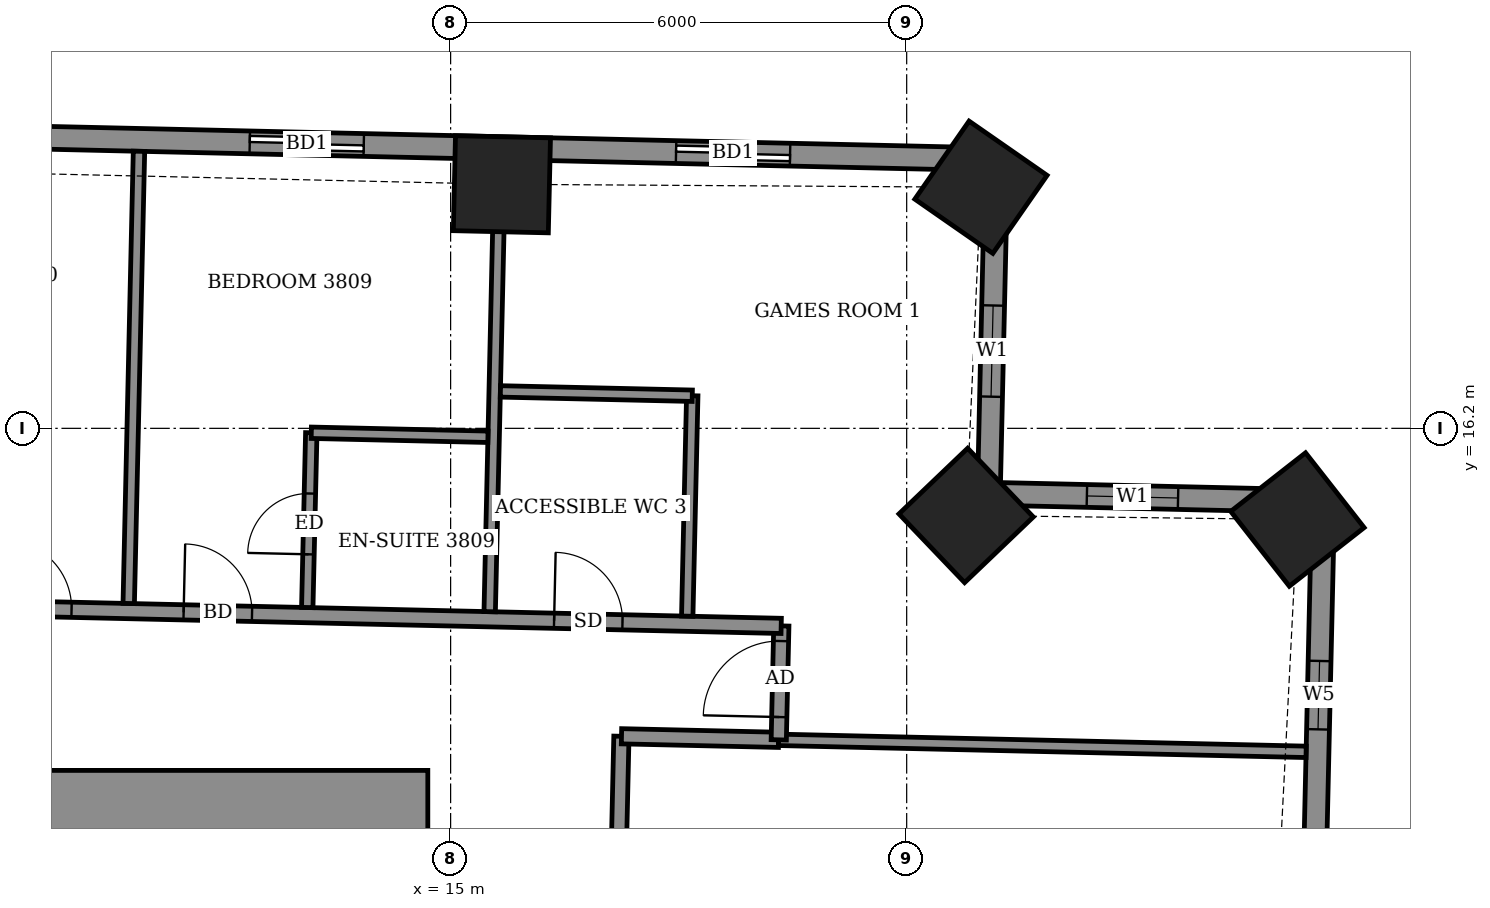
"""IFC4 building model, lengths in metres.
Left out: names, types, materials, properties, quantities, classifications, styles, units other than length and angle.
Written with IfcOpenShell. Run it as: python <this file> out.ifc"""

import sys

from ifc_helpers import new_model, si_unit, direction, frame, frame_2d, origin, origin_2d, place, context, subcontext, project, spatial, rectangle, extrude, element, fill, save


model = new_model("IFC4")
c1 = context("Model", 3, precision=1e-05, world=origin(), true_north=direction((0.0, 1.0)))
c2 = subcontext(c1, "Body", "Model", "MODEL_VIEW")
j1 = project(units=[si_unit("LENGTHUNIT", "METRE"), si_unit("PLANEANGLEUNIT", "RADIAN")], contexts=[c1])
p1 = place(None, origin())
s1 = spatial("IfcSite", under=j1, at=p1, CompositionType="ELEMENT")
p2 = place(p1, origin())
s2 = spatial("IfcBuilding", under=s1, at=p2, CompositionType="ELEMENT")
p3 = place(p2, frame((0.0, 0.0, 152.7)))
s3 = spatial("IfcBuildingStorey", under=s2, at=p3, CompositionType="ELEMENT", Elevation=152.7)
for number, where, z_axis, x_axis in (
    (1, (26.141, 15.001, -0.55), (0.0, 0.0, 1.0), (-0.617, 0.787, 0.0)),
    (2, (21.782, 15.054, -0.55), (0.0, 0.0, 1.0), (-0.691, 0.723, 0.0)),
    (3, (21.977, 19.372, -0.55), (0.0, 0.0, 1.0), (-0.821, 0.571, 0.0)),
    (4, (15.675, 19.411, -0.55), (0.0, 0.0, 1.0), (-1.0, 0.023, 0.0)),
):
    element("IfcColumn", number, at=place(p3, frame(where, z_axis=z_axis, x_axis=x_axis)), inside=s3, PredefinedType="COLUMN", context=c2, shape_type="SweptSolid", body=[
        extrude(rectangle(XDim=1.25, YDim=1.25, at=origin_2d()), origin(), (0.0, 0.0, 1.0), 3.6),
    ])
p4 = place(p3, frame((26.238, 4.613, 0.0), z_axis=(0.0, 0.0, 1.0), x_axis=(0.022761056451, 0.999740933597, 0.0)))
e5 = element("IfcWall", 5, at=p4, inside=s3, PredefinedType="SOLIDWALL", context=c2, shape_type="SweptSolid", body=[
    extrude(rectangle(XDim=10.63, YDim=0.3, at=frame_2d((5.315, 0.0))), origin(), (0.0, 0.0, 1.0), 3.05),
])
p5 = place(p4, frame((3.453, 0.0, 0.0)))
e6 = element("IfcOpeningElement", 6, at=p5, cuts=e5, PredefinedType="OPENING", context=c2, shape_type="SweptSolid", body=[
    extrude(rectangle(XDim=1.2, YDim=2.4, at=frame_2d((0.6, 1.2))), frame((0.0, 0.16, 0.0), z_axis=(0.0, -1.0, 0.0), x_axis=(1.0, 0.0, 0.0)), (0.0, 0.0, 1.0), 0.32),
])
p6 = place(p4, frame((7.629, 0.0, 0.9)))
e7 = element("IfcOpeningElement", 7, at=p6, cuts=e5, PredefinedType="OPENING", context=c2, shape_type="SweptSolid", body=[
    extrude(rectangle(XDim=0.9, YDim=1.5, at=frame_2d((0.45, 0.75))), frame((0.0, 0.16, 0.0), z_axis=(0.0, -1.0, 0.0), x_axis=(1.0, 0.0, 0.0)), (0.0, 0.0, 1.0), 0.32),
])
p7 = place(p3, frame((26.48, 15.24, 0.0), z_axis=(0.0, 0.0, 1.0), x_axis=(-0.999741204967, 0.022749133868, 0.0)))
e8 = element("IfcWall", 8, at=p7, inside=s3, PredefinedType="SOLIDWALL", context=c2, shape_type="SweptSolid", body=[
    extrude(rectangle(XDim=4.4, YDim=0.3, at=frame_2d((2.2, 0.0))), origin(), (0.0, 0.0, 1.0), 2.55),
])
p8 = place(p7, frame((1.91, 0.0, 0.9)))
e9 = element("IfcOpeningElement", 9, at=p8, cuts=e8, PredefinedType="OPENING", context=c2, shape_type="SweptSolid", body=[
    extrude(rectangle(XDim=1.2, YDim=1.5, at=frame_2d((0.6, 0.75))), frame((0.0, 0.16, 0.0), z_axis=(0.0, -1.0, 0.0), x_axis=(1.0, 0.0, 0.0)), (0.0, 0.0, 1.0), 0.32),
])
p9 = place(p3, frame((22.081, 15.34, 0.0), z_axis=(0.0, 0.0, 1.0), x_axis=(0.022693676786, 0.999742465355, 0.0)))
e10 = element("IfcWall", 10, at=p9, inside=s3, PredefinedType="SOLIDWALL", context=c2, shape_type="SweptSolid", body=[
    extrude(rectangle(XDim=4.4, YDim=0.3, at=frame_2d((2.2, 0.0))), origin(), (0.0, 0.0, 1.0), 2.55),
])
p10 = place(p9, frame((1.277, 0.0, 0.9)))
e11 = element("IfcOpeningElement", 11, at=p10, cuts=e10, PredefinedType="OPENING", context=c2, shape_type="SweptSolid", body=[
    extrude(rectangle(XDim=1.2, YDim=1.5, at=frame_2d((0.6, 0.75))), frame((0.0, 0.16, 0.0), z_axis=(0.0, -1.0, 0.0), x_axis=(1.0, 0.0, 0.0)), (0.0, 0.0, 1.0), 0.32),
])
p11 = place(p3, frame((22.181, 19.739, 0.0), z_axis=(0.0, 0.0, 1.0), x_axis=(-0.999742618326, 0.022686936846, 0.0)))
e12 = element("IfcWall", 12, at=p11, inside=s3, PredefinedType="SOLIDWALL", context=c2, shape_type="SweptSolid", body=[
    extrude(rectangle(XDim=39.58, YDim=0.3, at=frame_2d((19.79, 0.0))), origin(), (0.0, 0.0, 1.0), 3.05),
])
p12 = place(p11, frame((2.716, 0.0, 0.0)))
e13 = element("IfcOpeningElement", 13, at=p12, cuts=e12, PredefinedType="OPENING", context=c2, shape_type="SweptSolid", body=[
    extrude(rectangle(XDim=1.5, YDim=2.4, at=frame_2d((0.75, 1.2))), frame((0.0, 0.16, 0.0), z_axis=(0.0, -1.0, 0.0), x_axis=(1.0, 0.0, 0.0)), (0.0, 0.0, 1.0), 0.32),
])
p13 = place(p11, frame((8.326, 0.0, 0.0)))
e14 = element("IfcOpeningElement", 14, at=p13, cuts=e12, PredefinedType="OPENING", context=c2, shape_type="SweptSolid", body=[
    extrude(rectangle(XDim=1.5, YDim=2.4, at=frame_2d((0.75, 1.2))), frame((0.0, 0.16, 0.0), z_axis=(0.0, -1.0, 0.0), x_axis=(1.0, 0.0, 0.0)), (0.0, 0.0, 1.0), 0.32),
])
p14 = place(p11, frame((14.049, 0.0, 0.0)))
e15 = element("IfcOpeningElement", 15, at=p14, cuts=e12, PredefinedType="OPENING", context=c2, shape_type="SweptSolid", body=[
    extrude(rectangle(XDim=1.5, YDim=2.4, at=frame_2d((0.75, 1.2))), frame((0.0, 0.16, 0.0), z_axis=(0.0, -1.0, 0.0), x_axis=(1.0, 0.0, 0.0)), (0.0, 0.0, 1.0), 0.32),
])
p15 = place(p11, frame((16.998, 0.0, 0.0)))
e16 = element("IfcOpeningElement", 16, at=p15, cuts=e12, PredefinedType="OPENING", context=c2, shape_type="SweptSolid", body=[
    extrude(rectangle(XDim=1.5, YDim=2.4, at=frame_2d((0.75, 1.2))), frame((0.0, 0.16, 0.0), z_axis=(0.0, -1.0, 0.0), x_axis=(1.0, 0.0, 0.0)), (0.0, 0.0, 1.0), 0.32),
])
p16 = place(p11, frame((22.48, 0.0, 0.0)))
e17 = element("IfcOpeningElement", 17, at=p16, cuts=e12, PredefinedType="OPENING", context=c2, shape_type="SweptSolid", body=[
    extrude(rectangle(XDim=1.5, YDim=2.4, at=frame_2d((0.75, 1.2))), frame((0.0, 0.16, 0.0), z_axis=(0.0, -1.0, 0.0), x_axis=(1.0, 0.0, 0.0)), (0.0, 0.0, 1.0), 0.32),
])
p17 = place(p11, frame((27.846, 0.0, 0.0)))
e18 = element("IfcOpeningElement", 18, at=p17, cuts=e12, PredefinedType="OPENING", context=c2, shape_type="SweptSolid", body=[
    extrude(rectangle(XDim=1.5, YDim=2.4, at=frame_2d((0.75, 1.2))), frame((0.0, 0.16, 0.0), z_axis=(0.0, -1.0, 0.0), x_axis=(1.0, 0.0, 0.0)), (0.0, 0.0, 1.0), 0.32),
])
p18 = place(p11, frame((30.794, 0.0, 0.0)))
e19 = element("IfcOpeningElement", 19, at=p18, cuts=e12, PredefinedType="OPENING", context=c2, shape_type="SweptSolid", body=[
    extrude(rectangle(XDim=1.5, YDim=2.4, at=frame_2d((0.75, 1.2))), frame((0.0, 0.16, 0.0), z_axis=(0.0, -1.0, 0.0), x_axis=(1.0, 0.0, 0.0)), (0.0, 0.0, 1.0), 0.32),
])
p19 = place(p11, frame((35.705, 0.0, 0.9)))
e20 = element("IfcOpeningElement", 20, at=p19, cuts=e12, PredefinedType="OPENING", context=c2, shape_type="SweptSolid", body=[
    extrude(rectangle(XDim=2.4, YDim=1.5, at=frame_2d((1.2, 0.75))), frame((0.0, 0.16, 0.0), z_axis=(0.0, -1.0, 0.0), x_axis=(1.0, 0.0, 0.0)), (0.0, 0.0, 1.0), 0.32),
])
p20 = place(p3, frame((17.149, 7.832, 0.0), z_axis=(0.0, 0.0, 1.0), x_axis=(0.022729111383, 0.999741660378, 0.0)))
e21 = element("IfcWall", 21, at=p20, inside=s3, PredefinedType="PARTITIONING", context=c2, shape_type="SweptSolid", body=[
    extrude(rectangle(XDim=4.318, YDim=0.2, at=frame_2d((2.159, 0.0))), origin(), (0.0, 0.0, 1.0), 3.05),
])
p21 = place(p20, frame((1.761, 0.0, 0.0)))
e22 = element("IfcOpeningElement", 22, at=p21, cuts=e21, PredefinedType="OPENING", context=c2, shape_type="SweptSolid", body=[
    extrude(rectangle(XDim=1.0, YDim=2.1, at=frame_2d((0.5, 1.05))), frame((0.0, 0.11, 0.0), z_axis=(0.0, -1.0, 0.0), x_axis=(1.0, 0.0, 0.0)), (0.0, 0.0, 1.0), 0.22),
])
p22 = place(p3, frame((17.248, 12.149, 0.0), z_axis=(0.0, 0.0, 1.0), x_axis=(0.999742931749, -0.02267312106, 0.0)))
e23 = element("IfcWall", 23, at=p22, inside=s3, PredefinedType="PARTITIONING", context=c2, shape_type="SweptSolid", body=[
    extrude(rectangle(XDim=2.067, YDim=0.2, at=frame_2d((1.034, 0.0))), origin(), (0.0, 0.0, 1.0), 3.05),
])
p23 = place(p3, frame((19.315, 12.102, 0.0), z_axis=(0.0, 0.0, 1.0), x_axis=(0.999741072391, -0.022754959327, 0.0)))
e24 = element("IfcWall", 24, at=p23, inside=s3, PredefinedType="PARTITIONING", context=c2, shape_type="SweptSolid", body=[
    extrude(rectangle(XDim=6.942, YDim=0.15, at=frame_2d((3.471, 0.0))), origin(), (0.0, 0.0, 1.0), 2.55),
])
p24 = place(p3, frame((19.317, 12.102, 0.0), z_axis=(0.0, 0.0, 1.0), x_axis=(0.02279537805, 0.999740151609, 0.0)))
e25 = element("IfcWall", 25, at=p24, inside=s3, PredefinedType="PARTITIONING", context=c2, shape_type="SweptSolid", body=[
    extrude(rectangle(XDim=1.5, YDim=0.2, at=frame_2d((0.75, 0.0))), origin(), (0.0, 0.0, 1.0), 3.05),
])
p25 = place(p24, frame((0.3, 0.0, 0.0)))
e26 = element("IfcOpeningElement", 26, at=p25, cuts=e25, PredefinedType="OPENING", context=c2, shape_type="SweptSolid", body=[
    extrude(rectangle(XDim=1.0, YDim=2.1, at=frame_2d((0.5, 1.05))), frame((0.0, 0.11, 0.0), z_axis=(0.0, -1.0, 0.0), x_axis=(1.0, 0.0, 0.0)), (0.0, 0.0, 1.0), 0.22),
])
p26 = place(p3, frame((-21.279, 14.523, 0.0), z_axis=(0.0, 0.0, 1.0), x_axis=(0.999742669174, -0.02268469602, 0.0)))
e27 = element("IfcWall", 27, at=p26, inside=s3, PredefinedType="PARTITIONING", context=c2, shape_type="SweptSolid", body=[
    extrude(rectangle(XDim=40.639, YDim=0.2, at=frame_2d((20.319, 0.0))), origin(), (0.0, 0.0, 1.0), 3.05),
])
p27 = place(p26, frame((37.65, 0.0, 0.0)))
e28 = element("IfcOpeningElement", 28, at=p27, cuts=e27, PredefinedType="OPENING", context=c2, shape_type="SweptSolid", body=[
    extrude(rectangle(XDim=0.9, YDim=2.1, at=frame_2d((0.45, 1.05))), frame((0.0, 0.11, 0.0), z_axis=(0.0, -1.0, 0.0), x_axis=(1.0, 0.0, 0.0)), (0.0, 0.0, 1.0), 0.22),
])
p28 = place(p26, frame((32.775, 0.0, 0.0)))
e29 = element("IfcOpeningElement", 29, at=p28, cuts=e27, PredefinedType="OPENING", context=c2, shape_type="SweptSolid", body=[
    extrude(rectangle(XDim=0.9, YDim=2.1, at=frame_2d((0.45, 1.05))), frame((0.0, 0.11, 0.0), z_axis=(0.0, -1.0, 0.0), x_axis=(1.0, 0.0, 0.0)), (0.0, 0.0, 1.0), 0.22),
])
p29 = place(p26, frame((30.4, 0.0, 0.0)))
e30 = element("IfcOpeningElement", 30, at=p29, cuts=e27, PredefinedType="OPENING", context=c2, shape_type="SweptSolid", body=[
    extrude(rectangle(XDim=0.9, YDim=2.1, at=frame_2d((0.45, 1.05))), frame((0.0, 0.11, 0.0), z_axis=(0.0, -1.0, 0.0), x_axis=(1.0, 0.0, 0.0)), (0.0, 0.0, 1.0), 0.22),
])
p30 = place(p26, frame((23.225, 0.0, 0.0)))
e31 = element("IfcOpeningElement", 31, at=p30, cuts=e27, PredefinedType="OPENING", context=c2, shape_type="SweptSolid", body=[
    extrude(rectangle(XDim=0.9, YDim=2.1, at=frame_2d((0.45, 1.05))), frame((0.0, 0.11, 0.0), z_axis=(0.0, -1.0, 0.0), x_axis=(1.0, 0.0, 0.0)), (0.0, 0.0, 1.0), 0.22),
])
p31 = place(p26, frame((20.85, 0.0, 0.0)))
e32 = element("IfcOpeningElement", 32, at=p31, cuts=e27, PredefinedType="OPENING", context=c2, shape_type="SweptSolid", body=[
    extrude(rectangle(XDim=0.9, YDim=2.1, at=frame_2d((0.45, 1.05))), frame((0.0, 0.11, 0.0), z_axis=(0.0, -1.0, 0.0), x_axis=(1.0, 0.0, 0.0)), (0.0, 0.0, 1.0), 0.22),
])
p32 = place(p26, frame((13.675, 0.0, 0.0)))
e33 = element("IfcOpeningElement", 33, at=p32, cuts=e27, PredefinedType="OPENING", context=c2, shape_type="SweptSolid", body=[
    extrude(rectangle(XDim=0.9, YDim=2.1, at=frame_2d((0.45, 1.05))), frame((0.0, 0.11, 0.0), z_axis=(0.0, -1.0, 0.0), x_axis=(1.0, 0.0, 0.0)), (0.0, 0.0, 1.0), 0.22),
])
p33 = place(p26, frame((11.325, 0.0, 0.0)))
e34 = element("IfcOpeningElement", 34, at=p33, cuts=e27, PredefinedType="OPENING", context=c2, shape_type="SweptSolid", body=[
    extrude(rectangle(XDim=0.9, YDim=2.1, at=frame_2d((0.45, 1.05))), frame((0.0, 0.11, 0.0), z_axis=(0.0, -1.0, 0.0), x_axis=(1.0, 0.0, 0.0)), (0.0, 0.0, 1.0), 0.22),
])
p34 = place(p26, frame((1.6, 0.0, 0.0)))
e35 = element("IfcOpeningElement", 35, at=p34, cuts=e27, PredefinedType="OPENING", context=c2, shape_type="SweptSolid", body=[
    extrude(rectangle(XDim=1.0, YDim=2.1, at=frame_2d((0.5, 1.05))), frame((0.0, 0.11, 0.0), z_axis=(0.0, -1.0, 0.0), x_axis=(1.0, 0.0, 0.0)), (0.0, 0.0, 1.0), 0.22),
])
p35 = place(p26, frame((6.55, 0.0, 0.0)))
e36 = element("IfcOpeningElement", 36, at=p35, cuts=e27, PredefinedType="OPENING", context=c2, shape_type="SweptSolid", body=[
    extrude(rectangle(XDim=0.9, YDim=2.1, at=frame_2d((0.45, 1.05))), frame((0.0, 0.11, 0.0), z_axis=(0.0, -1.0, 0.0), x_axis=(1.0, 0.0, 0.0)), (0.0, 0.0, 1.0), 0.22),
])
p36 = place(p3, frame((10.765, 13.896, 0.0), z_axis=(0.0, 0.0, 1.0), x_axis=(0.022688785847, 0.999742576365, 0.0)))
e37 = element("IfcWall", 37, at=p36, inside=s3, PredefinedType="PARTITIONING", context=c2, shape_type="SweptSolid", body=[
    extrude(rectangle(XDim=5.95, YDim=0.15, at=frame_2d((2.975, 0.0))), origin(), (0.0, 0.0, 1.0), 2.55),
])
p37 = place(p3, frame((13.114, 13.843, 0.0), z_axis=(0.0, 0.0, 1.0), x_axis=(0.023037316498, 0.999734605807, 0.0)))
e38 = element("IfcWall", 38, at=p37, inside=s3, PredefinedType="PARTITIONING", context=c2, shape_type="SweptSolid", body=[
    extrude(rectangle(XDim=2.3, YDim=0.15, at=frame_2d((1.15, 0.0))), origin(), (0.0, 0.0, 1.0), 3.05),
])
p38 = place(p37, frame((0.7, 0.0, 0.0)))
e39 = element("IfcOpeningElement", 39, at=p38, cuts=e38, PredefinedType="OPENING", context=c2, shape_type="SweptSolid", body=[
    extrude(rectangle(XDim=0.8, YDim=2.1, at=frame_2d((0.4, 1.05))), frame((0.0, 0.085, 0.0), z_axis=(0.0, -1.0, 0.0), x_axis=(1.0, 0.0, 0.0)), (0.0, 0.0, 1.0), 0.17),
])
p39 = place(p3, frame((15.514, 13.788, 0.0), z_axis=(0.0, 0.0, 1.0), x_axis=(0.022688785847, 0.999742576365, 0.0)))
e40 = element("IfcWall", 40, at=p39, inside=s3, PredefinedType="PARTITIONING", context=c2, shape_type="SweptSolid", body=[
    extrude(rectangle(XDim=5.95, YDim=0.15, at=frame_2d((2.975, 0.0))), origin(), (0.0, 0.0, 1.0), 3.05),
])
p40 = place(p3, frame((18.113, 13.729, 0.0), z_axis=(0.0, 0.0, 1.0), x_axis=(0.022725229174, 0.999741748633, 0.0)))
e41 = element("IfcWall", 41, at=p40, inside=s3, PredefinedType="PARTITIONING", context=c2, shape_type="SweptSolid", body=[
    extrude(rectangle(XDim=2.901, YDim=0.15, at=frame_2d((1.45, 0.0))), origin(), (0.0, 0.0, 1.0), 3.05),
])
p41 = place(p3, frame((13.167, 16.142, 0.0), z_axis=(0.0, 0.0, 1.0), x_axis=(0.999740260747, -0.02279059109, 0.0)))
e42 = element("IfcWall", 42, at=p41, inside=s3, PredefinedType="PARTITIONING", context=c2, shape_type="SweptSolid", body=[
    extrude(rectangle(XDim=2.324, YDim=0.15, at=frame_2d((1.162, 0.0))), origin(), (0.0, 0.0, 1.0), 3.05),
])
p42 = place(p3, frame((15.655, 16.686, 0.0), z_axis=(0.0, 0.0, 1.0), x_axis=(0.99974392816, -0.022629142889, 0.0)))
e43 = element("IfcWall", 43, at=p42, inside=s3, PredefinedType="PARTITIONING", context=c2, shape_type="SweptSolid", body=[
    extrude(rectangle(XDim=2.525, YDim=0.15, at=frame_2d((1.262, 0.0))), origin(), (0.0, 0.0, 1.0), 3.05),
])
p43 = place(p3, frame((-14.7, 11.25, 0.0), z_axis=(0.0, 0.0, 1.0), x_axis=(1.0, 0.0, 0.0)))
e44 = element("IfcWall", 44, at=p43, inside=s3, PredefinedType="SHEAR", context=c2, shape_type="SweptSolid", body=[
    extrude(rectangle(XDim=29.4, YDim=0.9, at=frame_2d((14.7, 0.0))), origin(), (0.0, 0.0, 1.0), 3.6),
])
p44 = place(p6, origin())
e45 = element("IfcWindow", 45, at=p44, inside=s3, PartitioningType="SINGLE_PANEL", PredefinedType="WINDOW", context=c2, shape_type="SweptSolid", body=[
    extrude(rectangle(XDim=0.9, YDim=1.5, at=frame_2d((0.45, 0.75))), frame((0.0, 0.03, 0.0), z_axis=(0.0, -1.0, 0.0), x_axis=(1.0, 0.0, 0.0)), (0.0, 0.0, 1.0), 0.06),
])
fill(e7, e45)
p45 = place(p8, origin())
e46 = element("IfcWindow", 46, at=p45, inside=s3, PartitioningType="SINGLE_PANEL", PredefinedType="WINDOW", context=c2, shape_type="SweptSolid", body=[
    extrude(rectangle(XDim=1.2, YDim=1.5, at=frame_2d((0.6, 0.75))), frame((0.0, 0.03, 0.0), z_axis=(0.0, -1.0, 0.0), x_axis=(1.0, 0.0, 0.0)), (0.0, 0.0, 1.0), 0.06),
])
fill(e9, e46)
p46 = place(p10, origin())
e47 = element("IfcWindow", 47, at=p46, inside=s3, PartitioningType="SINGLE_PANEL", PredefinedType="WINDOW", context=c2, shape_type="SweptSolid", body=[
    extrude(rectangle(XDim=1.2, YDim=1.5, at=frame_2d((0.6, 0.75))), frame((0.0, 0.03, 0.0), z_axis=(0.0, -1.0, 0.0), x_axis=(1.0, 0.0, 0.0)), (0.0, 0.0, 1.0), 0.06),
])
fill(e11, e47)
p47 = place(p12, origin())
e48 = element("IfcDoor", 48, at=p47, inside=s3, OperationType="SLIDING_TO_LEFT", PredefinedType="DOOR", context=c2, shape_type="SweptSolid", body=[
    extrude(rectangle(XDim=1.5, YDim=2.4, at=frame_2d((0.75, 1.2))), frame((0.0, 0.025, 0.0), z_axis=(0.0, -1.0, 0.0), x_axis=(1.0, 0.0, 0.0)), (0.0, 0.0, 1.0), 0.05),
])
fill(e13, e48)
p48 = place(p13, origin())
e49 = element("IfcDoor", 49, at=p48, inside=s3, OperationType="SLIDING_TO_LEFT", PredefinedType="DOOR", context=c2, shape_type="SweptSolid", body=[
    extrude(rectangle(XDim=1.5, YDim=2.4, at=frame_2d((0.75, 1.2))), frame((0.0, 0.025, 0.0), z_axis=(0.0, -1.0, 0.0), x_axis=(1.0, 0.0, 0.0)), (0.0, 0.0, 1.0), 0.05),
])
fill(e14, e49)
p49 = place(p25, origin())
e50 = element("IfcDoor", 50, at=p49, inside=s3, OperationType="SINGLE_SWING_LEFT", PredefinedType="DOOR", context=c2, shape_type="SweptSolid", body=[
    extrude(rectangle(XDim=1.0, YDim=2.1, at=frame_2d((0.5, 1.05))), frame((0.0, 0.025, 0.0), z_axis=(0.0, -1.0, 0.0), x_axis=(1.0, 0.0, 0.0)), (0.0, 0.0, 1.0), 0.05),
])
fill(e26, e50)
p50 = place(p27, origin())
e51 = element("IfcDoor", 51, at=p50, inside=s3, OperationType="SINGLE_SWING_LEFT", PredefinedType="DOOR", context=c2, shape_type="SweptSolid", body=[
    extrude(rectangle(XDim=0.9, YDim=2.1, at=frame_2d((0.45, 1.05))), frame((0.0, 0.025, 0.0), z_axis=(0.0, -1.0, 0.0), x_axis=(1.0, 0.0, 0.0)), (0.0, 0.0, 1.0), 0.05),
])
fill(e28, e51)
p51 = place(p28, origin())
e52 = element("IfcDoor", 52, at=p51, inside=s3, OperationType="SINGLE_SWING_LEFT", PredefinedType="DOOR", context=c2, shape_type="SweptSolid", body=[
    extrude(rectangle(XDim=0.9, YDim=2.1, at=frame_2d((0.45, 1.05))), frame((0.0, 0.025, 0.0), z_axis=(0.0, -1.0, 0.0), x_axis=(1.0, 0.0, 0.0)), (0.0, 0.0, 1.0), 0.05),
])
fill(e29, e52)
p52 = place(p38, origin())
e53 = element("IfcDoor", 53, at=p52, inside=s3, OperationType="SINGLE_SWING_LEFT", PredefinedType="DOOR", context=c2, shape_type="SweptSolid", body=[
    extrude(rectangle(XDim=0.8, YDim=2.1, at=frame_2d((0.4, 1.05))), frame((0.0, 0.025, 0.0), z_axis=(0.0, -1.0, 0.0), x_axis=(1.0, 0.0, 0.0)), (0.0, 0.0, 1.0), 0.05),
])
fill(e39, e53)
p53 = place(p29, origin())
e54 = element("IfcDoor", 54, at=p53, inside=s3, OperationType="SINGLE_SWING_RIGHT", PredefinedType="DOOR", context=c2, shape_type="SweptSolid", body=[
    extrude(rectangle(XDim=0.9, YDim=2.1, at=frame_2d((0.45, 1.05))), frame((0.0, 0.025, 0.0), z_axis=(0.0, -1.0, 0.0), x_axis=(1.0, 0.0, 0.0)), (0.0, 0.0, 1.0), 0.05),
])
fill(e30, e54)
save(model, sys.argv[1])
